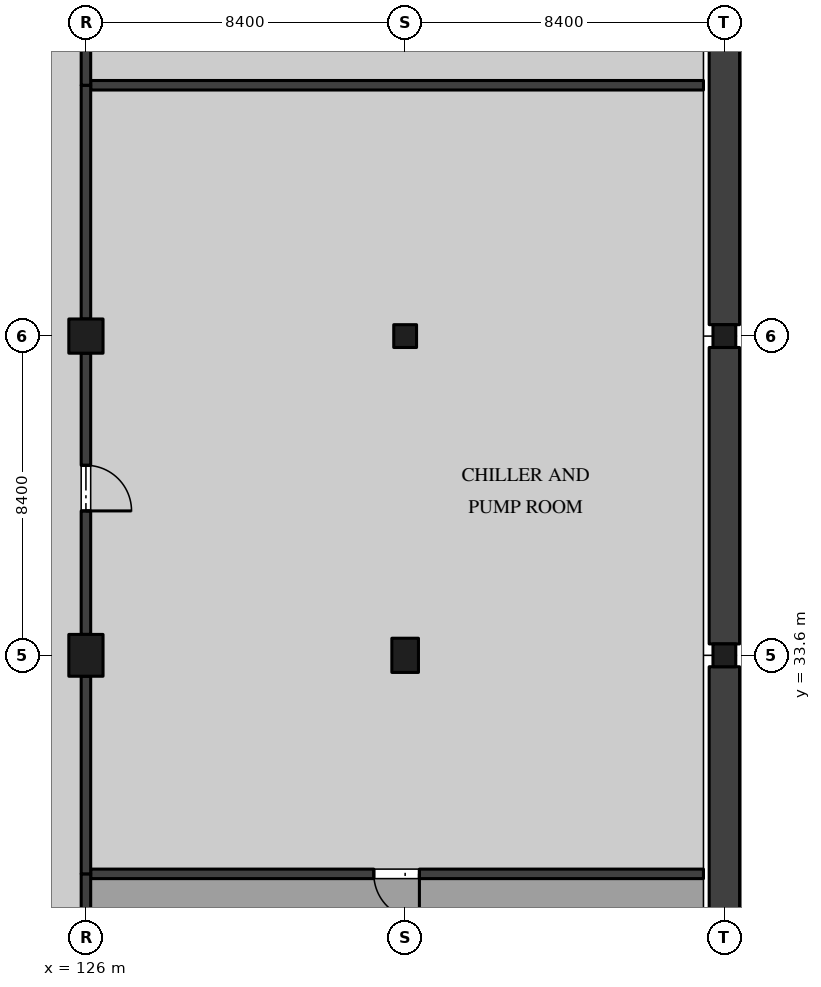
"""IFC4 building model, lengths in metres.
Left out: names, types, materials, properties, quantities, classifications, styles, units other than length and angle.
Written with IfcOpenShell. Run it as: python <this file> out.ifc"""

import sys

from ifc_helpers import new_model, si_unit, direction, frame, frame_2d, origin, origin_2d, place, context, subcontext, project, spatial, rectangle, extrude, element, fill, save


model = new_model("IFC4")
c1 = context("Model", 3, precision=1e-05, world=origin(), true_north=direction((0.0, 1.0)))
c2 = subcontext(c1, "Body", "Model", "MODEL_VIEW")
j1 = project(units=[si_unit("LENGTHUNIT", "METRE"), si_unit("PLANEANGLEUNIT", "RADIAN")], contexts=[c1])
p1 = place(None, origin())
s1 = spatial("IfcSite", under=j1, at=p1, CompositionType="ELEMENT")
p2 = place(p1, origin())
s2 = spatial("IfcBuilding", under=s1, at=p2, CompositionType="ELEMENT")
p3 = place(p2, frame((0.0, 0.0, -4.5)))
s3 = spatial("IfcBuildingStorey", under=s2, at=p3, CompositionType="ELEMENT", Elevation=-4.5)
p4 = place(p3, frame((126.0, 33.6, 0.0), z_axis=(0.0, 0.0, 1.0), x_axis=(1.0, 0.0, 0.0)))
e1 = element("IfcColumn", 1, at=p4, inside=s3, PredefinedType="COLUMN", context=c2, shape_type="SweptSolid", body=[
    extrude(rectangle(XDim=0.9, YDim=1.1, at=origin_2d()), origin(), (0.0, 0.0, 1.0), 4.05),
])
p5 = place(p3, frame((126.0, 42.0, 0.0), z_axis=(0.0, 0.0, 1.0), x_axis=(1.0, 0.0, 0.0)))
e2 = element("IfcColumn", 2, at=p5, inside=s3, PredefinedType="COLUMN", context=c2, shape_type="SweptSolid", body=[
    extrude(rectangle(XDim=0.9, YDim=0.9, at=origin_2d()), origin(), (0.0, 0.0, 1.0), 4.05),
])
p6 = place(p3, frame((134.4, 33.6, 0.0), z_axis=(0.0, 0.0, 1.0), x_axis=(1.0, 0.0, 0.0)))
e3 = element("IfcColumn", 3, at=p6, inside=s3, PredefinedType="COLUMN", context=c2, shape_type="SweptSolid", body=[
    extrude(rectangle(XDim=0.7, YDim=0.9, at=origin_2d()), origin(), (0.0, 0.0, 1.0), 4.05),
])
for number, where, z_axis, x_axis in (
    (4, (134.4, 42.0, 0.0), (0.0, 0.0, 1.0), (1.0, 0.0, 0.0)),
    (5, (142.8, 33.6, 0.0), (0.0, 0.0, 1.0), (1.0, 0.0, 0.0)),
    (6, (142.8, 42.0, 0.0), (0.0, 0.0, 1.0), (1.0, 0.0, 0.0)),
):
    element("IfcColumn", number, at=place(p3, frame(where, z_axis=z_axis, x_axis=x_axis)), inside=s3, PredefinedType="COLUMN", context=c2, shape_type="SweptSolid", body=[
        extrude(rectangle(XDim=0.6, YDim=0.6, at=origin_2d()), origin(), (0.0, 0.0, 1.0), 4.05),
    ])
for number, where, z_axis, x_axis in (
    (7, (142.8, 25.5, 0.0), (0.0, 0.0, 1.0), (0.0, 1.0, 0.0)),
    (8, (142.8, 33.9, 0.0), (0.0, 0.0, 1.0), (0.0, 1.0, 0.0)),
    (9, (142.8, 42.3, 0.0), (0.0, 0.0, 1.0), (0.0, 1.0, 0.0)),
):
    element("IfcWall", number, at=place(p3, frame(where, z_axis=z_axis, x_axis=x_axis)), inside=s3, PredefinedType="SOLIDWALL", context=c2, shape_type="SweptSolid", body=[
        extrude(rectangle(XDim=7.8, YDim=0.8, at=frame_2d((3.9, 0.0))), origin(), (0.0, 0.0, 1.0), 4.05),
    ])
p7 = place(p3, frame((126.125, 27.85, 0.0), z_axis=(0.0, 0.0, 1.0), x_axis=(1.0, 0.0, 0.0)))
e10 = element("IfcWall", 10, at=p7, inside=s3, PredefinedType="PARTITIONING", context=c2, shape_type="SweptSolid", body=[
    extrude(rectangle(XDim=16.125, YDim=0.25, at=frame_2d((8.062, 0.0))), origin(), (0.0, 0.0, 1.0), 4.05),
])
p8 = place(p7, frame((7.45, 0.0, 0.0)))
e11 = element("IfcOpeningElement", 11, at=p8, cuts=e10, PredefinedType="OPENING", context=c2, shape_type="SweptSolid", body=[
    extrude(rectangle(XDim=1.2, YDim=2.1, at=frame_2d((0.6, 1.05))), frame((0.0, 0.135, 0.0), z_axis=(0.0, -1.0, 0.0), x_axis=(1.0, 0.0, 0.0)), (0.0, 0.0, 1.0), 0.27),
])
p9 = place(p3, frame((126.0, 25.5, 0.0), z_axis=(0.0, 0.0, 1.0), x_axis=(0.0, 1.0, 0.0)))
e12 = element("IfcWall", 12, at=p9, inside=s3, PredefinedType="PARTITIONING", context=c2, shape_type="SweptSolid", body=[
    extrude(rectangle(XDim=2.35, YDim=0.25, at=frame_2d((1.175, 0.0))), origin(), (0.0, 0.0, 1.0), 4.05),
])
p10 = place(p3, frame((126.125, 48.6, 0.0), z_axis=(0.0, 0.0, 1.0), x_axis=(1.0, 0.0, 0.0)))
e13 = element("IfcWall", 13, at=p10, inside=s3, PredefinedType="PARTITIONING", context=c2, shape_type="SweptSolid", body=[
    extrude(rectangle(XDim=16.125, YDim=0.25, at=frame_2d((8.062, 0.0))), origin(), (0.0, 0.0, 1.0), 4.05),
])
p11 = place(p3, frame((126.0, 27.85, 0.0), z_axis=(0.0, 0.0, 1.0), x_axis=(0.0, 1.0, 0.0)))
e14 = element("IfcWall", 14, at=p11, inside=s3, PredefinedType="PARTITIONING", context=c2, shape_type="SweptSolid", body=[
    extrude(rectangle(XDim=5.2, YDim=0.25, at=frame_2d((2.6, 0.0))), origin(), (0.0, 0.0, 1.0), 4.05),
])
p12 = place(p3, frame((126.0, 34.15, 0.0), z_axis=(0.0, 0.0, 1.0), x_axis=(0.0, 1.0, 0.0)))
e15 = element("IfcWall", 15, at=p12, inside=s3, PredefinedType="PARTITIONING", context=c2, shape_type="SweptSolid", body=[
    extrude(rectangle(XDim=7.4, YDim=0.25, at=frame_2d((3.7, 0.0))), origin(), (0.0, 0.0, 1.0), 4.05),
])
p13 = place(p12, frame((3.25, 0.0, 0.0)))
e16 = element("IfcOpeningElement", 16, at=p13, cuts=e15, PredefinedType="OPENING", context=c2, shape_type="SweptSolid", body=[
    extrude(rectangle(XDim=1.2, YDim=2.1, at=frame_2d((0.6, 1.05))), frame((0.0, 0.135, 0.0), z_axis=(0.0, -1.0, 0.0), x_axis=(1.0, 0.0, 0.0)), (0.0, 0.0, 1.0), 0.27),
])
p14 = place(p3, frame((126.0, 42.45, 0.0), z_axis=(0.0, 0.0, 1.0), x_axis=(0.0, 1.0, 0.0)))
e17 = element("IfcWall", 17, at=p14, inside=s3, PredefinedType="PARTITIONING", context=c2, shape_type="SweptSolid", body=[
    extrude(rectangle(XDim=6.15, YDim=0.25, at=frame_2d((3.075, 0.0))), origin(), (0.0, 0.0, 1.0), 4.05),
])
p15 = place(p3, frame((126.0, 48.6, 0.0), z_axis=(0.0, 0.0, 1.0), x_axis=(0.0, 1.0, 0.0)))
e18 = element("IfcWall", 18, at=p15, inside=s3, PredefinedType="PARTITIONING", context=c2, shape_type="SweptSolid", body=[
    extrude(rectangle(XDim=1.35, YDim=0.25, at=frame_2d((0.675, 0.0))), origin(), (0.0, 0.0, 1.0), 4.05),
])
p16 = place(p8, frame((1.2, 0.0, 0.0), z_axis=(0.0, 0.0, 1.0), x_axis=(-1.0, 0.0, 0.0)))
e19 = element("IfcDoor", 19, at=p16, inside=s3, OperationType="SINGLE_SWING_RIGHT", PredefinedType="DOOR", context=c2, shape_type="SweptSolid", body=[
    extrude(rectangle(XDim=1.2, YDim=2.1, at=frame_2d((0.6, 1.05))), frame((0.0, 0.05, 0.0), z_axis=(0.0, -1.0, 0.0), x_axis=(1.0, 0.0, 0.0)), (0.0, 0.0, 1.0), 0.1),
])
fill(e11, e19)
p17 = place(p13, frame((1.2, 0.0, 0.0), z_axis=(0.0, 0.0, 1.0), x_axis=(-1.0, 0.0, 0.0)))
e20 = element("IfcDoor", 20, at=p17, inside=s3, OperationType="SINGLE_SWING_LEFT", PredefinedType="DOOR", context=c2, shape_type="SweptSolid", body=[
    extrude(rectangle(XDim=1.2, YDim=2.1, at=frame_2d((0.6, 1.05))), frame((0.0, 0.05, 0.0), z_axis=(0.0, -1.0, 0.0), x_axis=(1.0, 0.0, 0.0)), (0.0, 0.0, 1.0), 0.1),
])
fill(e16, e20)
save(model, sys.argv[1])
